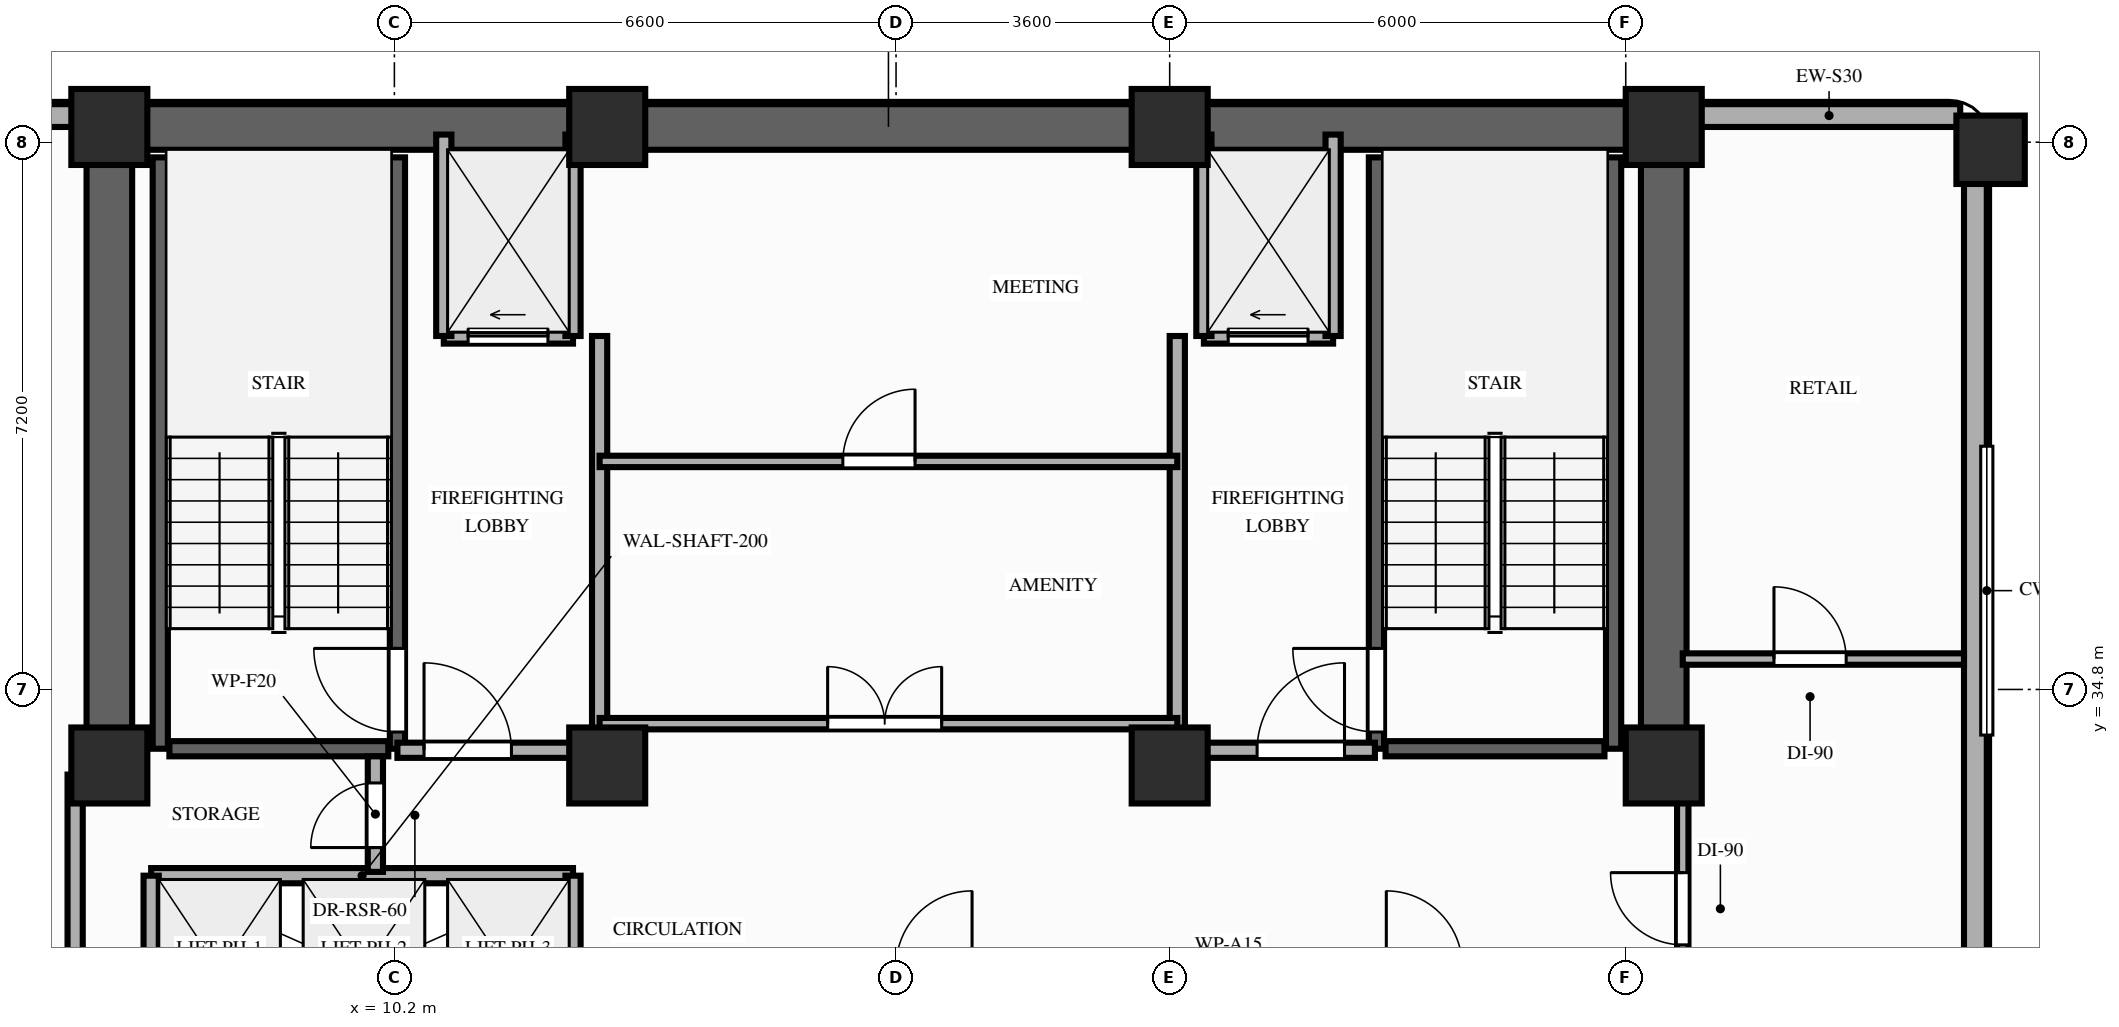
"""IFC4 building model, lengths in metres.
Left out: names, types, materials, properties, quantities, classifications, styles, units other than length and angle.
Written with IfcOpenShell. Run it as: python <this file> out.ifc"""

import sys

from ifc_helpers import new_model, si_unit, direction, frame, frame_2d, origin, origin_2d, place, context, subcontext, project, spatial, rectangle, extrude, element, fill, save


model = new_model("IFC4")
c1 = context("Model", 3, precision=1e-05, world=origin(), true_north=direction((0.0, 1.0)))
c2 = subcontext(c1, "Body", "Model", "MODEL_VIEW")
j1 = project(units=[si_unit("LENGTHUNIT", "METRE"), si_unit("PLANEANGLEUNIT", "RADIAN")], contexts=[c1])
p1 = place(None, origin())
s1 = spatial("IfcSite", under=j1, at=p1, CompositionType="ELEMENT")
p2 = place(p1, origin())
s2 = spatial("IfcBuilding", under=s1, at=p2, CompositionType="ELEMENT")
p3 = place(p2, frame((0.0, 0.0, 166.4)))
s3 = spatial("IfcBuildingStorey", under=s2, at=p3, CompositionType="ELEMENT", Elevation=166.4)
for number, where, z_axis, x_axis in (
    (1, (6.45, 33.8, 0.0), (0.0, 0.0, 1.0), (1.0, 0.0, 0.0)),
    (2, (13.0, 33.8, 0.0), (0.0, 0.0, 1.0), (1.0, 0.0, 0.0)),
    (3, (20.4, 33.8, 0.0), (0.0, 0.0, 1.0), (1.0, 0.0, 0.0)),
    (4, (26.9, 33.8, 0.0), (0.0, 0.0, 1.0), (1.0, 0.0, 0.0)),
    (5, (6.45, 42.2, 0.0), (0.0, 0.0, 1.0), (1.0, 0.0, 0.0)),
    (6, (13.0, 42.2, 0.0), (0.0, 0.0, 1.0), (1.0, 0.0, 0.0)),
    (7, (20.4, 42.2, 0.0), (0.0, 0.0, 1.0), (1.0, 0.0, 0.0)),
    (8, (26.9, 42.2, 0.0), (0.0, 0.0, 1.0), (1.0, 0.0, 0.0)),
):
    element("IfcColumn", number, at=place(p3, frame(where, z_axis=z_axis, x_axis=x_axis)), inside=s3, PredefinedType="COLUMN", context=c2, shape_type="SweptSolid", body=[
        extrude(rectangle(XDim=1.0, YDim=1.0, at=origin_2d()), origin(), (0.0, 0.0, 1.0), 3.2),
    ])
p4 = place(p3, frame((31.2, 41.9, 0.0), z_axis=(0.0, 0.0, 1.0), x_axis=(1.0, 0.0, 0.0)))
e9 = element("IfcColumn", 9, at=p4, inside=s3, PredefinedType="COLUMN", context=c2, shape_type="SweptSolid", body=[
    extrude(rectangle(XDim=0.9, YDim=0.9, at=origin_2d()), origin(), (0.0, 0.0, 1.0), 3.2),
])
p5 = place(p3, frame((30.8, 42.35, 0.0), z_axis=(0.0, 0.0, 1.0), x_axis=(-1.0, 0.0, 0.0)))
e10 = element("IfcWall", 10, at=p5, inside=s3, PredefinedType="STANDARD", context=c2, shape_type="SweptSolid", body=[
    extrude(rectangle(XDim=3.45, YDim=0.3, at=frame_2d((1.725, 0.0))), origin(), (0.0, 0.0, 1.0), 2.45),
])
p6 = place(p3, frame((6.0, 42.35, 0.0), z_axis=(0.0, 0.0, 1.0), x_axis=(-1.0, 0.0, 0.0)))
e11 = element("IfcWall", 11, at=p6, inside=s3, PredefinedType="STANDARD", context=c2, shape_type="SweptSolid", body=[
    extrude(rectangle(XDim=2.0, YDim=0.3, at=frame_2d((1.0, 0.0))), origin(), (0.0, 0.0, 1.0), 3.02),
])
p7 = place(p3, frame((31.0, 26.8, 0.0), z_axis=(0.0, 0.0, 1.0), x_axis=(0.0, 1.0, 0.0)))
e12 = element("IfcWall", 12, at=p7, inside=s3, PredefinedType="STANDARD", context=c2, shape_type="SweptSolid", body=[
    extrude(rectangle(XDim=15.35, YDim=0.3, at=frame_2d((7.675, 0.0))), origin(), (0.0, 0.0, 1.0), 2.45),
])
p8 = place(p3, frame((6.45, 42.2, 0.0), z_axis=(0.0, 0.0, 1.0), x_axis=(1.0, 0.0, 0.0)))
e13 = element("IfcWall", 13, at=p8, inside=s3, PredefinedType="SHEAR", context=c2, shape_type="SweptSolid", body=[
    extrude(rectangle(XDim=20.45, YDim=0.6, at=frame_2d((10.225, 0.0))), origin(), (0.0, 0.0, 1.0), 3.02),
])
for number, where, z_axis, x_axis in (
    (14, (6.45, 33.8, 0.0), (0.0, 0.0, 1.0), (0.0, 1.0, 0.0)),
    (15, (26.9, 33.8, 0.0), (0.0, 0.0, 1.0), (0.0, 1.0, 0.0)),
):
    element("IfcWall", number, at=place(p3, frame(where, z_axis=z_axis, x_axis=x_axis)), inside=s3, PredefinedType="SHEAR", context=c2, shape_type="SweptSolid", body=[
        extrude(rectangle(XDim=7.95, YDim=0.6, at=frame_2d((3.975, 0.0))), origin(), (0.0, 0.0, 1.0), 3.02),
    ])
p9 = place(p3, frame((7.12, 34.02, 0.0), z_axis=(0.0, 0.0, 1.0), x_axis=(0.0, 1.0, 0.0)))
e16 = element("IfcWall", 16, at=p9, inside=s3, PredefinedType="SHEAR", context=c2, shape_type="SweptSolid", body=[
    extrude(rectangle(XDim=7.78, YDim=0.2, at=frame_2d((3.89, 0.0))), origin(), (0.0, 0.0, 1.0), 3.02),
])
p10 = place(p3, frame((10.24, 34.02, 0.0), z_axis=(0.0, 0.0, 1.0), x_axis=(0.0, 1.0, 0.0)))
e17 = element("IfcWall", 17, at=p10, inside=s3, PredefinedType="SHEAR", context=c2, shape_type="SweptSolid", body=[
    extrude(rectangle(XDim=7.78, YDim=0.2, at=frame_2d((3.89, 0.0))), origin(), (0.0, 0.0, 1.0), 3.02),
])
p11 = place(p10, frame((0.22, 0.0, 0.0)))
e18 = element("IfcOpeningElement", 18, at=p11, cuts=e17, PredefinedType="OPENING", context=c2, shape_type="SweptSolid", body=[
    extrude(rectangle(XDim=1.1, YDim=2.15, at=frame_2d((0.55, 1.075))), frame((0.0, 0.11, 0.0), z_axis=(0.0, -1.0, 0.0), x_axis=(1.0, 0.0, 0.0)), (0.0, 0.0, 1.0), 0.22),
])
p12 = place(p3, frame((7.24, 34.02, 0.0), z_axis=(0.0, 0.0, 1.0), x_axis=(1.0, 0.0, 0.0)))
e19 = element("IfcWall", 19, at=p12, inside=s3, PredefinedType="SHEAR", context=c2, shape_type="SweptSolid", body=[
    extrude(rectangle(XDim=2.88, YDim=0.2, at=frame_2d((1.44, 0.0))), origin(), (0.0, 0.0, 1.0), 3.02),
])
p13 = place(p3, frame((23.12, 34.02, 0.0), z_axis=(0.0, 0.0, 1.0), x_axis=(0.0, 1.0, 0.0)))
e20 = element("IfcWall", 20, at=p13, inside=s3, PredefinedType="SHEAR", context=c2, shape_type="SweptSolid", body=[
    extrude(rectangle(XDim=7.78, YDim=0.2, at=frame_2d((3.89, 0.0))), origin(), (0.0, 0.0, 1.0), 3.02),
])
p14 = place(p13, frame((0.22, 0.0, 0.0)))
e21 = element("IfcOpeningElement", 21, at=p14, cuts=e20, PredefinedType="OPENING", context=c2, shape_type="SweptSolid", body=[
    extrude(rectangle(XDim=1.1, YDim=2.15, at=frame_2d((0.55, 1.075))), frame((0.0, 0.11, 0.0), z_axis=(0.0, -1.0, 0.0), x_axis=(1.0, 0.0, 0.0)), (0.0, 0.0, 1.0), 0.22),
])
p15 = place(p3, frame((26.24, 34.02, 0.0), z_axis=(0.0, 0.0, 1.0), x_axis=(0.0, 1.0, 0.0)))
e22 = element("IfcWall", 22, at=p15, inside=s3, PredefinedType="SHEAR", context=c2, shape_type="SweptSolid", body=[
    extrude(rectangle(XDim=7.78, YDim=0.2, at=frame_2d((3.89, 0.0))), origin(), (0.0, 0.0, 1.0), 3.02),
])
p16 = place(p3, frame((23.24, 34.02, 0.0), z_axis=(0.0, 0.0, 1.0), x_axis=(1.0, 0.0, 0.0)))
e23 = element("IfcWall", 23, at=p16, inside=s3, PredefinedType="SHEAR", context=c2, shape_type="SweptSolid", body=[
    extrude(rectangle(XDim=2.88, YDim=0.2, at=frame_2d((1.44, 0.0))), origin(), (0.0, 0.0, 1.0), 3.02),
])
p17 = place(p3, frame((7.0, 32.35, 0.0), z_axis=(0.0, 0.0, 1.0), x_axis=(1.0, 0.0, 0.0)))
e24 = element("IfcWall", 24, at=p17, inside=s3, PredefinedType="MOVABLE", context=c2, shape_type="SweptSolid", body=[
    extrude(rectangle(XDim=5.55, YDim=0.2, at=frame_2d((2.775, 0.0))), origin(), (0.0, 0.0, 1.0), 3.02),
])
for number, where, z_axis, x_axis in (
    (25, (7.0, 29.85, 0.0), (0.0, 0.0, 1.0), (0.0, 1.0, 0.0)),
    (26, (12.55, 29.85, 0.0), (0.0, 0.0, 1.0), (0.0, 1.0, 0.0)),
):
    element("IfcWall", number, at=place(p3, frame(where, z_axis=z_axis, x_axis=x_axis)), inside=s3, PredefinedType="MOVABLE", context=c2, shape_type="SweptSolid", body=[
        extrude(rectangle(XDim=2.5, YDim=0.2, at=frame_2d((1.25, 0.0))), origin(), (0.0, 0.0, 1.0), 3.02),
    ])
p18 = place(p3, frame((10.85, 39.45, 0.0), z_axis=(0.0, 0.0, 1.0), x_axis=(1.0, 0.0, 0.0)))
e27 = element("IfcWall", 27, at=p18, inside=s3, PredefinedType="MOVABLE", context=c2, shape_type="SweptSolid", body=[
    extrude(rectangle(XDim=1.7, YDim=0.2, at=frame_2d((0.85, 0.0))), origin(), (0.0, 0.0, 1.0), 3.02),
])
p19 = place(p18, frame((0.32, 0.0, 0.0)))
e28 = element("IfcOpeningElement", 28, at=p19, cuts=e27, PredefinedType="OPENING", context=c2, shape_type="SweptSolid", body=[
    extrude(rectangle(XDim=1.05, YDim=2.15, at=frame_2d((0.525, 1.075))), frame((0.0, 0.11, 0.0), z_axis=(0.0, -1.0, 0.0), x_axis=(1.0, 0.0, 0.0)), (0.0, 0.0, 1.0), 0.22),
])
p20 = place(p3, frame((20.85, 39.45, 0.0), z_axis=(0.0, 0.0, 1.0), x_axis=(1.0, 0.0, 0.0)))
e29 = element("IfcWall", 29, at=p20, inside=s3, PredefinedType="MOVABLE", context=c2, shape_type="SweptSolid", body=[
    extrude(rectangle(XDim=1.7, YDim=0.2, at=frame_2d((0.85, 0.0))), origin(), (0.0, 0.0, 1.0), 3.02),
])
p21 = place(p20, frame((0.32, 0.0, 0.0)))
e30 = element("IfcOpeningElement", 30, at=p21, cuts=e29, PredefinedType="OPENING", context=c2, shape_type="SweptSolid", body=[
    extrude(rectangle(XDim=1.05, YDim=2.15, at=frame_2d((0.525, 1.075))), frame((0.0, 0.11, 0.0), z_axis=(0.0, -1.0, 0.0), x_axis=(1.0, 0.0, 0.0)), (0.0, 0.0, 1.0), 0.22),
])
for number, where, z_axis, x_axis in (
    (31, (10.85, 39.45, 0.0), (0.0, 0.0, 1.0), (0.0, 1.0, 0.0)),
    (32, (12.55, 39.45, 0.0), (0.0, 0.0, 1.0), (0.0, 1.0, 0.0)),
):
    element("IfcWall", number, at=place(p3, frame(where, z_axis=z_axis, x_axis=x_axis)), inside=s3, PredefinedType="MOVABLE", context=c2, shape_type="SweptSolid", body=[
        extrude(rectangle(XDim=2.65, YDim=0.2, at=frame_2d((1.325, 0.0))), origin(), (0.0, 0.0, 1.0), 2.45),
    ])
p22 = place(p3, frame((12.9, 34.0, 0.0), z_axis=(0.0, 0.0, 1.0), x_axis=(0.0, 1.0, 0.0)))
e33 = element("IfcWall", 33, at=p22, inside=s3, PredefinedType="PARTITIONING", context=c2, shape_type="SweptSolid", body=[
    extrude(rectangle(XDim=5.45, YDim=0.2, at=frame_2d((2.725, 0.0))), origin(), (0.0, 0.0, 1.0), 2.45),
])
p23 = place(p3, frame((10.24, 34.0, 0.0), z_axis=(0.0, 0.0, 1.0), x_axis=(1.0, 0.0, 0.0)))
e34 = element("IfcWall", 34, at=p23, inside=s3, PredefinedType="PARTITIONING", context=c2, shape_type="SweptSolid", body=[
    extrude(rectangle(XDim=2.66, YDim=0.2, at=frame_2d((1.33, 0.0))), origin(), (0.0, 0.0, 1.0), 2.45),
])
p24 = place(p23, frame((0.35, 0.0, 0.0)))
e35 = element("IfcOpeningElement", 35, at=p24, cuts=e34, PredefinedType="OPENING", context=c2, shape_type="SweptSolid", body=[
    extrude(rectangle(XDim=1.15, YDim=2.15, at=frame_2d((0.575, 1.075))), frame((0.0, 0.11, 0.0), z_axis=(0.0, -1.0, 0.0), x_axis=(1.0, 0.0, 0.0)), (0.0, 0.0, 1.0), 0.22),
])
for number, where, z_axis, x_axis in (
    (36, (20.85, 39.45, 0.0), (0.0, 0.0, 1.0), (0.0, 1.0, 0.0)),
    (37, (22.55, 39.45, 0.0), (0.0, 0.0, 1.0), (0.0, 1.0, 0.0)),
):
    element("IfcWall", number, at=place(p3, frame(where, z_axis=z_axis, x_axis=x_axis)), inside=s3, PredefinedType="MOVABLE", context=c2, shape_type="SweptSolid", body=[
        extrude(rectangle(XDim=2.65, YDim=0.2, at=frame_2d((1.325, 0.0))), origin(), (0.0, 0.0, 1.0), 2.45),
    ])
p25 = place(p3, frame((20.5, 34.0, 0.0), z_axis=(0.0, 0.0, 1.0), x_axis=(0.0, 1.0, 0.0)))
e38 = element("IfcWall", 38, at=p25, inside=s3, PredefinedType="PARTITIONING", context=c2, shape_type="SweptSolid", body=[
    extrude(rectangle(XDim=5.45, YDim=0.2, at=frame_2d((2.725, 0.0))), origin(), (0.0, 0.0, 1.0), 2.45),
])
p26 = place(p3, frame((20.5, 34.0, 0.0), z_axis=(0.0, 0.0, 1.0), x_axis=(1.0, 0.0, 0.0)))
e39 = element("IfcWall", 39, at=p26, inside=s3, PredefinedType="PARTITIONING", context=c2, shape_type="SweptSolid", body=[
    extrude(rectangle(XDim=2.6, YDim=0.2, at=frame_2d((1.3, 0.0))), origin(), (0.0, 0.0, 1.0), 2.45),
])
p27 = place(p26, frame((1.05, 0.0, 0.0)))
e40 = element("IfcOpeningElement", 40, at=p27, cuts=e39, PredefinedType="OPENING", context=c2, shape_type="SweptSolid", body=[
    extrude(rectangle(XDim=1.15, YDim=2.15, at=frame_2d((0.575, 1.075))), frame((0.0, 0.11, 0.0), z_axis=(0.0, -1.0, 0.0), x_axis=(1.0, 0.0, 0.0)), (0.0, 0.0, 1.0), 0.22),
])
p28 = place(p3, frame((9.95, 32.4, 0.0), z_axis=(0.0, 0.0, 1.0), x_axis=(0.0, 1.0, 0.0)))
e41 = element("IfcWall", 41, at=p28, inside=s3, PredefinedType="PARTITIONING", context=c2, shape_type="SweptSolid", body=[
    extrude(rectangle(XDim=1.52, YDim=0.2, at=frame_2d((0.76, 0.0))), origin(), (0.0, 0.0, 1.0), 2.45),
])
p29 = place(p28, frame((0.32, 0.0, 0.0)))
e42 = element("IfcOpeningElement", 42, at=p29, cuts=e41, PredefinedType="OPENING", context=c2, shape_type="SweptSolid", body=[
    extrude(rectangle(XDim=0.85, YDim=2.05, at=frame_2d((0.425, 1.025))), frame((0.0, 0.11, 0.0), z_axis=(0.0, -1.0, 0.0), x_axis=(1.0, 0.0, 0.0)), (0.0, 0.0, 1.0), 0.22),
])
p30 = place(p3, frame((12.9, 34.35, 0.0), z_axis=(0.0, 0.0, 1.0), x_axis=(1.0, 0.0, 0.0)))
e43 = element("IfcWall", 43, at=p30, inside=s3, PredefinedType="PARTITIONING", context=c2, shape_type="SweptSolid", body=[
    extrude(rectangle(XDim=7.6, YDim=0.15, at=frame_2d((3.8, 0.0))), origin(), (0.0, 0.0, 1.0), 3.02),
])
p31 = place(p30, frame((3.0, 0.0, 0.0)))
e44 = element("IfcOpeningElement", 44, at=p31, cuts=e43, PredefinedType="OPENING", context=c2, shape_type="SweptSolid", body=[
    extrude(rectangle(XDim=1.5, YDim=2.15, at=frame_2d((0.75, 1.075))), frame((0.0, 0.085, 0.0), z_axis=(0.0, -1.0, 0.0), x_axis=(1.0, 0.0, 0.0)), (0.0, 0.0, 1.0), 0.17),
])
p32 = place(p3, frame((12.9, 37.8, 0.0), z_axis=(0.0, 0.0, 1.0), x_axis=(1.0, 0.0, 0.0)))
e45 = element("IfcWall", 45, at=p32, inside=s3, PredefinedType="PARTITIONING", context=c2, shape_type="SweptSolid", body=[
    extrude(rectangle(XDim=7.6, YDim=0.15, at=frame_2d((3.8, 0.0))), origin(), (0.0, 0.0, 1.0), 3.02),
])
p33 = place(p32, frame((3.2, 0.0, 0.0)))
e46 = element("IfcOpeningElement", 46, at=p33, cuts=e45, PredefinedType="OPENING", context=c2, shape_type="SweptSolid", body=[
    extrude(rectangle(XDim=0.95, YDim=2.15, at=frame_2d((0.475, 1.075))), frame((0.0, 0.085, 0.0), z_axis=(0.0, -1.0, 0.0), x_axis=(1.0, 0.0, 0.0)), (0.0, 0.0, 1.0), 0.17),
])
p34 = place(p3, frame((6.0, 28.1, 0.0), z_axis=(0.0, 0.0, 1.0), x_axis=(0.0, 1.0, 0.0)))
e47 = element("IfcWall", 47, at=p34, inside=s3, PredefinedType="PARTITIONING", context=c2, shape_type="SweptSolid", body=[
    extrude(rectangle(XDim=5.58, YDim=0.2, at=frame_2d((2.79, 0.0))), origin(), (0.0, 0.0, 1.0), 2.45),
])
p35 = place(p3, frame((27.15, 26.75, 0.0), z_axis=(0.0, 0.0, 1.0), x_axis=(0.0, 1.0, 0.0)))
e48 = element("IfcWall", 48, at=p35, inside=s3, PredefinedType="PARTITIONING", context=c2, shape_type="SweptSolid", body=[
    extrude(rectangle(XDim=6.93, YDim=0.15, at=frame_2d((3.465, 0.0))), origin(), (0.0, 0.0, 1.0), 2.45),
])
p36 = place(p35, frame((4.69, 0.0, 0.0)))
e49 = element("IfcOpeningElement", 49, at=p36, cuts=e48, PredefinedType="OPENING", context=c2, shape_type="SweptSolid", body=[
    extrude(rectangle(XDim=0.95, YDim=2.15, at=frame_2d((0.475, 1.075))), frame((0.0, 0.085, 0.0), z_axis=(0.0, -1.0, 0.0), x_axis=(1.0, 0.0, 0.0)), (0.0, 0.0, 1.0), 0.17),
])
p37 = place(p3, frame((27.15, 35.2, 0.0), z_axis=(0.0, 0.0, 1.0), x_axis=(1.0, 0.0, 0.0)))
e50 = element("IfcWall", 50, at=p37, inside=s3, PredefinedType="PARTITIONING", context=c2, shape_type="SweptSolid", body=[
    extrude(rectangle(XDim=3.7, YDim=0.15, at=frame_2d((1.85, 0.0))), origin(), (0.0, 0.0, 1.0), 2.45),
])
p38 = place(p37, frame((1.2, 0.0, 0.0)))
e51 = element("IfcOpeningElement", 51, at=p38, cuts=e50, PredefinedType="OPENING", context=c2, shape_type="SweptSolid", body=[
    extrude(rectangle(XDim=0.95, YDim=2.15, at=frame_2d((0.475, 1.075))), frame((0.0, 0.085, 0.0), z_axis=(0.0, -1.0, 0.0), x_axis=(1.0, 0.0, 0.0)), (0.0, 0.0, 1.0), 0.17),
])
p39 = place(p11, origin())
e52 = element("IfcDoor", 52, at=p39, inside=s3, OperationType="SINGLE_SWING_RIGHT", PredefinedType="DOOR", context=c2, shape_type="SweptSolid", body=[
    extrude(rectangle(XDim=1.1, YDim=2.15, at=frame_2d((0.55, 1.075))), frame((0.0, 0.025, 0.0), z_axis=(0.0, -1.0, 0.0), x_axis=(1.0, 0.0, 0.0)), (0.0, 0.0, 1.0), 0.05),
])
fill(e18, e52)
p40 = place(p14, origin())
e53 = element("IfcDoor", 53, at=p40, inside=s3, OperationType="SINGLE_SWING_RIGHT", PredefinedType="DOOR", context=c2, shape_type="SweptSolid", body=[
    extrude(rectangle(XDim=1.1, YDim=2.15, at=frame_2d((0.55, 1.075))), frame((0.0, 0.025, 0.0), z_axis=(0.0, -1.0, 0.0), x_axis=(1.0, 0.0, 0.0)), (0.0, 0.0, 1.0), 0.05),
])
fill(e21, e53)
p41 = place(p19, origin())
e54 = element("IfcDoor", 54, at=p41, inside=s3, OperationType="SLIDING_TO_LEFT", PredefinedType="DOOR", context=c2, shape_type="SweptSolid", body=[
    extrude(rectangle(XDim=1.05, YDim=2.15, at=frame_2d((0.525, 1.075))), frame((0.0, 0.025, 0.0), z_axis=(0.0, -1.0, 0.0), x_axis=(1.0, 0.0, 0.0)), (0.0, 0.0, 1.0), 0.05),
])
fill(e28, e54)
p42 = place(p21, origin())
e55 = element("IfcDoor", 55, at=p42, inside=s3, OperationType="SLIDING_TO_LEFT", PredefinedType="DOOR", context=c2, shape_type="SweptSolid", body=[
    extrude(rectangle(XDim=1.05, YDim=2.15, at=frame_2d((0.525, 1.075))), frame((0.0, 0.025, 0.0), z_axis=(0.0, -1.0, 0.0), x_axis=(1.0, 0.0, 0.0)), (0.0, 0.0, 1.0), 0.05),
])
fill(e30, e55)
p43 = place(p24, origin())
e56 = element("IfcDoor", 56, at=p43, inside=s3, OperationType="SINGLE_SWING_LEFT", PredefinedType="DOOR", context=c2, shape_type="SweptSolid", body=[
    extrude(rectangle(XDim=1.15, YDim=2.15, at=frame_2d((0.575, 1.075))), frame((0.0, 0.025, 0.0), z_axis=(0.0, -1.0, 0.0), x_axis=(1.0, 0.0, 0.0)), (0.0, 0.0, 1.0), 0.05),
])
fill(e35, e56)
p44 = place(p27, origin())
e57 = element("IfcDoor", 57, at=p44, inside=s3, OperationType="SINGLE_SWING_RIGHT", PredefinedType="DOOR", context=c2, shape_type="SweptSolid", body=[
    extrude(rectangle(XDim=1.15, YDim=2.15, at=frame_2d((0.575, 1.075))), frame((0.0, 0.025, 0.0), z_axis=(0.0, -1.0, 0.0), x_axis=(1.0, 0.0, 0.0)), (0.0, 0.0, 1.0), 0.05),
])
fill(e40, e57)
p45 = place(p29, origin())
e58 = element("IfcDoor", 58, at=p45, inside=s3, OperationType="SINGLE_SWING_LEFT", PredefinedType="DOOR", context=c2, shape_type="SweptSolid", body=[
    extrude(rectangle(XDim=0.85, YDim=2.05, at=frame_2d((0.425, 1.025))), frame((0.0, 0.025, 0.0), z_axis=(0.0, -1.0, 0.0), x_axis=(1.0, 0.0, 0.0)), (0.0, 0.0, 1.0), 0.05),
])
fill(e42, e58)
p46 = place(p31, origin())
e59 = element("IfcDoor", 59, at=p46, inside=s3, OperationType="DOUBLE_DOOR_SINGLE_SWING", PredefinedType="DOOR", context=c2, shape_type="SweptSolid", body=[
    extrude(rectangle(XDim=1.5, YDim=2.15, at=frame_2d((0.75, 1.075))), frame((0.0, 0.025, 0.0), z_axis=(0.0, -1.0, 0.0), x_axis=(1.0, 0.0, 0.0)), (0.0, 0.0, 1.0), 0.05),
])
fill(e44, e59)
p47 = place(p33, origin())
e60 = element("IfcDoor", 60, at=p47, inside=s3, OperationType="SINGLE_SWING_RIGHT", PredefinedType="DOOR", context=c2, shape_type="SweptSolid", body=[
    extrude(rectangle(XDim=0.95, YDim=2.15, at=frame_2d((0.475, 1.075))), frame((0.0, 0.025, 0.0), z_axis=(0.0, -1.0, 0.0), x_axis=(1.0, 0.0, 0.0)), (0.0, 0.0, 1.0), 0.05),
])
fill(e46, e60)
p48 = place(p36, origin())
e61 = element("IfcDoor", 61, at=p48, inside=s3, OperationType="SINGLE_SWING_RIGHT", PredefinedType="DOOR", context=c2, shape_type="SweptSolid", body=[
    extrude(rectangle(XDim=0.95, YDim=2.15, at=frame_2d((0.475, 1.075))), frame((0.0, 0.025, 0.0), z_axis=(0.0, -1.0, 0.0), x_axis=(1.0, 0.0, 0.0)), (0.0, 0.0, 1.0), 0.05),
])
fill(e49, e61)
p49 = place(p38, origin())
e62 = element("IfcDoor", 62, at=p49, inside=s3, OperationType="SINGLE_SWING_LEFT", PredefinedType="DOOR", context=c2, shape_type="SweptSolid", body=[
    extrude(rectangle(XDim=0.95, YDim=2.15, at=frame_2d((0.475, 1.075))), frame((0.0, 0.025, 0.0), z_axis=(0.0, -1.0, 0.0), x_axis=(1.0, 0.0, 0.0)), (0.0, 0.0, 1.0), 0.05),
])
fill(e51, e62)
save(model, sys.argv[1])
